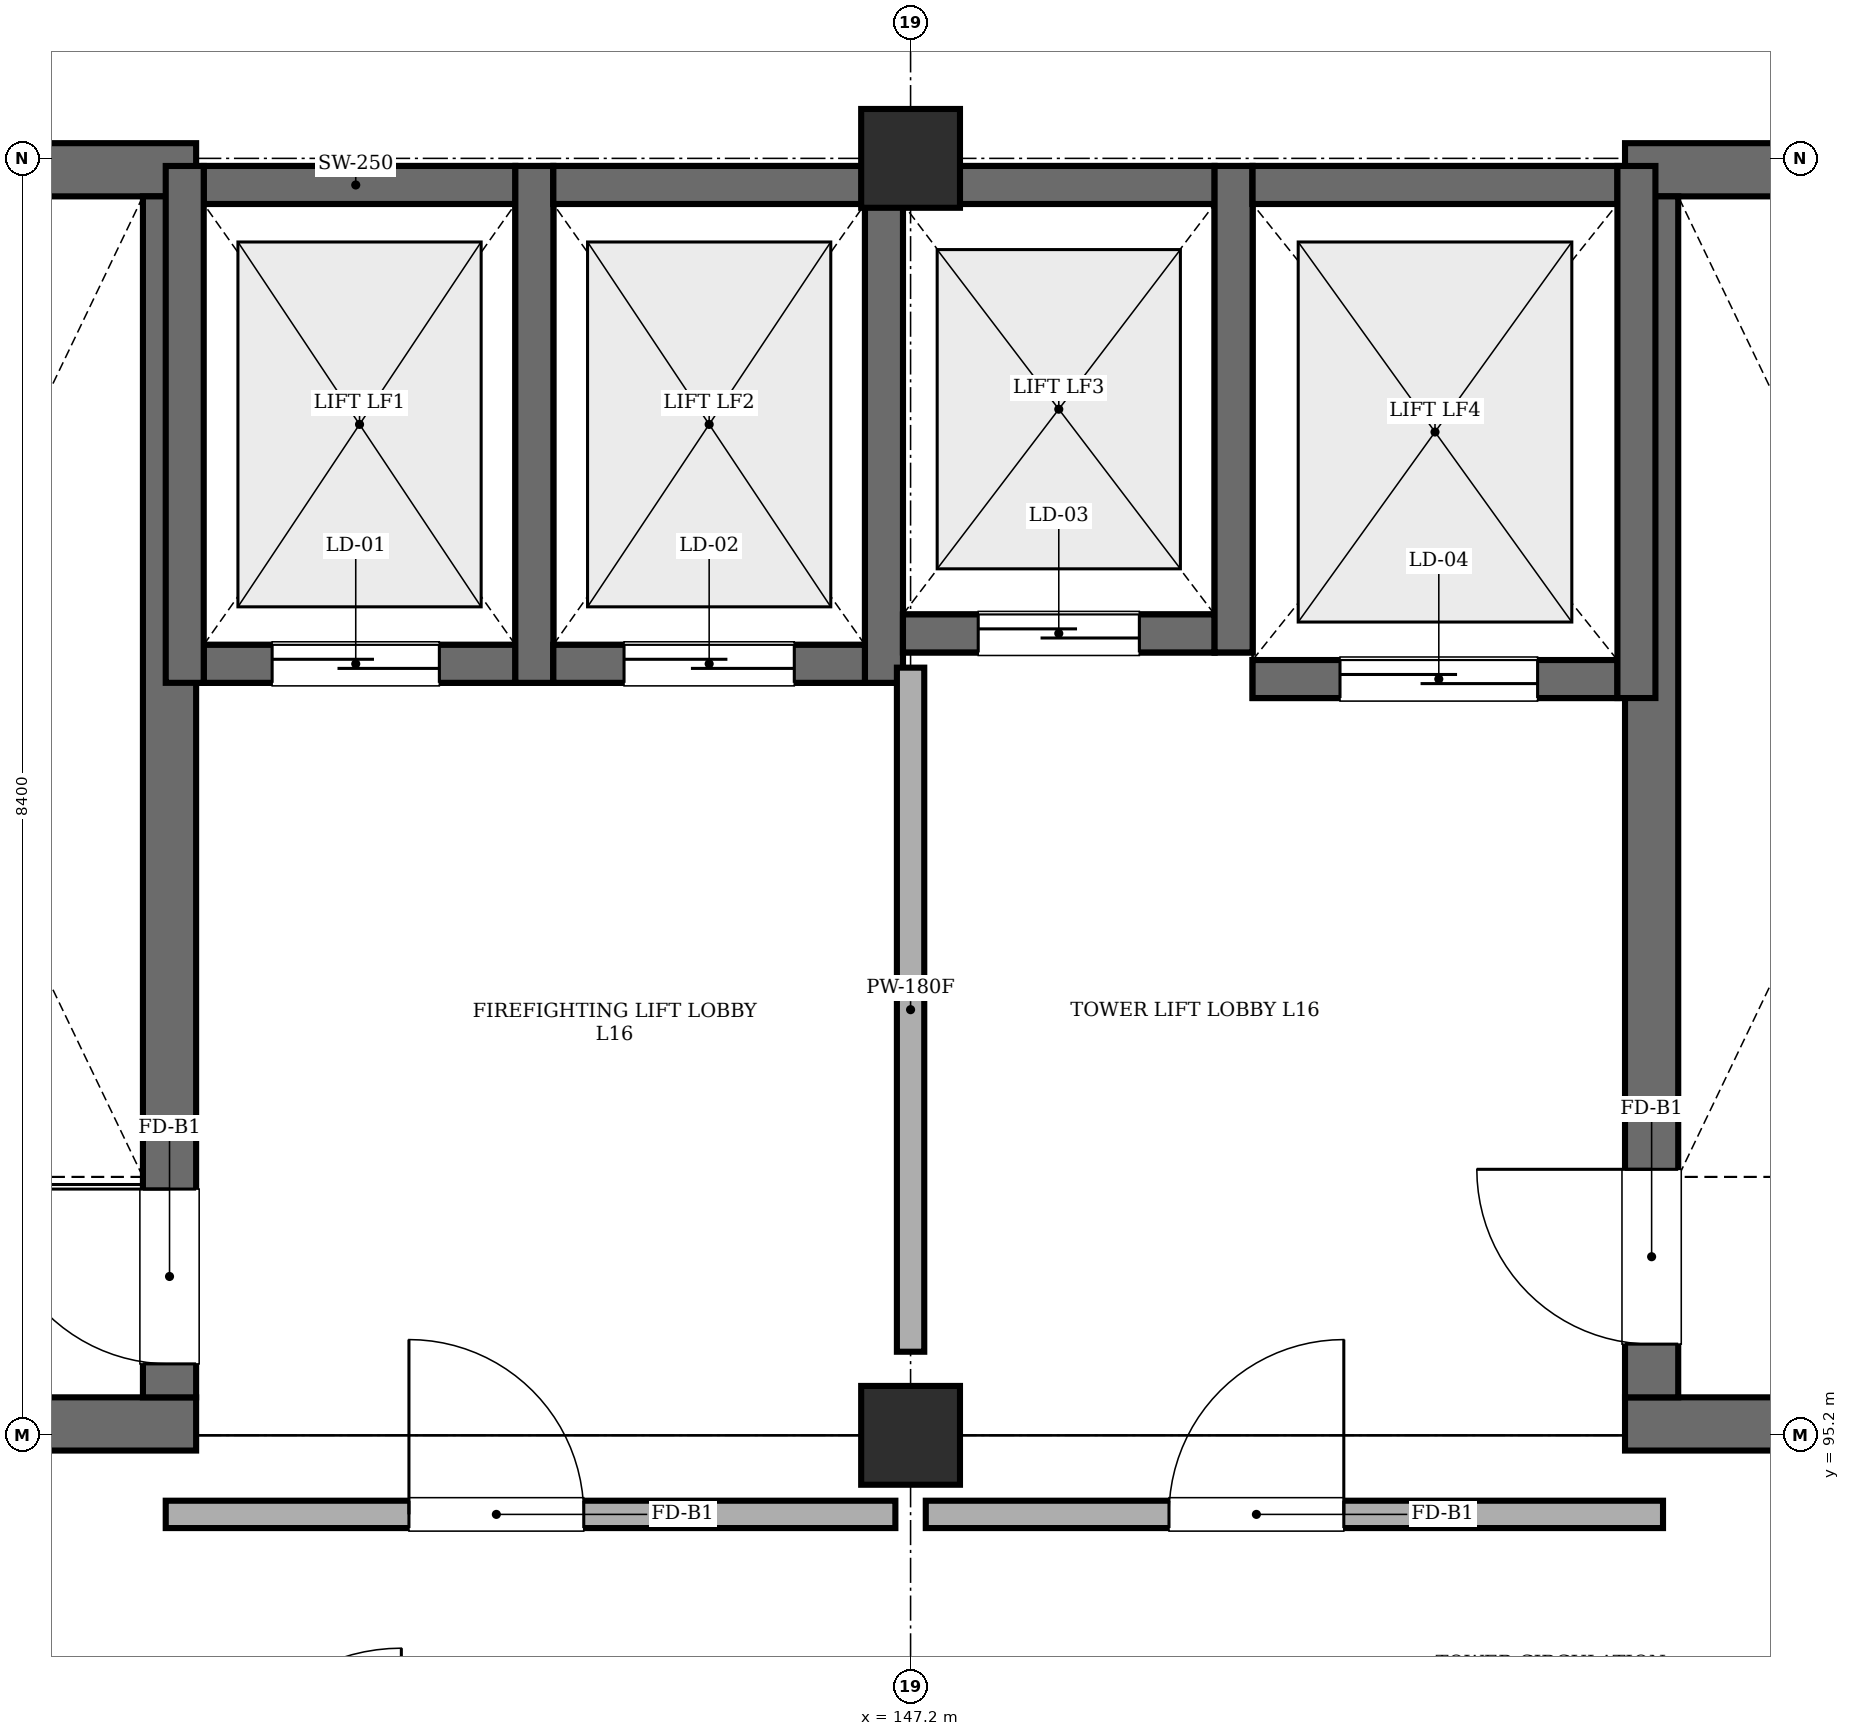
"""IFC4 building model, lengths in metres.
Left out: names, types, materials, properties, quantities, classifications, styles, units other than length and angle.
Written with IfcOpenShell. Run it as: python <this file> out.ifc"""

import sys

from ifc_helpers import new_model, si_unit, direction, frame, frame_2d, origin, origin_2d, place, context, subcontext, project, spatial, rectangle, extrude, element, fill, save


model = new_model("IFC4")
c1 = context("Model", 3, precision=1e-05, world=origin(), true_north=direction((0.0, 1.0)))
c2 = subcontext(c1, "Body", "Model", "MODEL_VIEW")
j1 = project(units=[si_unit("LENGTHUNIT", "METRE"), si_unit("PLANEANGLEUNIT", "RADIAN")], contexts=[c1])
p1 = place(None, origin())
s1 = spatial("IfcSite", under=j1, at=p1, CompositionType="ELEMENT")
p2 = place(p1, origin())
s2 = spatial("IfcBuilding", under=s1, at=p2, CompositionType="ELEMENT")
p3 = place(p2, frame((0.0, 0.0, 65.7)))
s3 = spatial("IfcBuildingStorey", under=s2, at=p3, CompositionType="ELEMENT", Elevation=65.7)
for number, where, z_axis, x_axis in (
    (1, (147.2, 95.2, 0.0), (0.0, 0.0, 1.0), (1.0, 0.0, 0.0)),
    (2, (147.2, 103.6, 0.0), (0.0, 0.0, 1.0), (1.0, 0.0, 0.0)),
):
    element("IfcColumn", number, at=place(p3, frame(where, z_axis=z_axis, x_axis=x_axis)), inside=s3, PredefinedType="COLUMN", context=c2, shape_type="SweptSolid", body=[
        extrude(rectangle(XDim=0.65, YDim=0.65, at=origin_2d()), origin(), (0.0, 0.0, 1.0), 4.3),
    ])
for number, where, z_axis, x_axis in (
    (3, (138.7, 95.275, 0.0), (0.0, 0.0, 1.0), (1.0, 0.0, 0.0)),
    (4, (138.7, 103.525, 0.0), (0.0, 0.0, 1.0), (1.0, 0.0, 0.0)),
):
    element("IfcWall", number, at=place(p3, frame(where, z_axis=z_axis, x_axis=x_axis)), inside=s3, PredefinedType="SHEAR", context=c2, shape_type="SweptSolid", body=[
        extrude(rectangle(XDim=3.8, YDim=0.35, at=frame_2d((1.9, 0.0))), origin(), (0.0, 0.0, 1.0), 4.3),
    ])
p4 = place(p3, frame((142.325, 95.45, 0.0), z_axis=(0.0, 0.0, 1.0), x_axis=(0.0, 1.0, 0.0)))
e5 = element("IfcWall", 5, at=p4, inside=s3, PredefinedType="SHEAR", context=c2, shape_type="SweptSolid", body=[
    extrude(rectangle(XDim=7.9, YDim=0.35, at=frame_2d((3.95, 0.0))), origin(), (0.0, 0.0, 1.0), 4.3),
])
p5 = place(p4, frame((0.22, 0.0, 0.0)))
e6 = element("IfcOpeningElement", 6, at=p5, cuts=e5, PredefinedType="OPENING", context=c2, shape_type="SweptSolid", body=[
    extrude(rectangle(XDim=1.15, YDim=2.15, at=frame_2d((0.575, 1.075))), frame((0.0, 0.185, 0.0), z_axis=(0.0, -1.0, 0.0), x_axis=(1.0, 0.0, 0.0)), (0.0, 0.0, 1.0), 0.37),
])
for number, where, z_axis, x_axis in (
    (7, (151.9, 95.275, 0.0), (0.0, 0.0, 1.0), (1.0, 0.0, 0.0)),
    (8, (151.9, 103.525, 0.0), (0.0, 0.0, 1.0), (1.0, 0.0, 0.0)),
):
    element("IfcWall", number, at=place(p3, frame(where, z_axis=z_axis, x_axis=x_axis)), inside=s3, PredefinedType="SHEAR", context=c2, shape_type="SweptSolid", body=[
        extrude(rectangle(XDim=3.8, YDim=0.35, at=frame_2d((1.9, 0.0))), origin(), (0.0, 0.0, 1.0), 4.3),
    ])
p6 = place(p3, frame((152.075, 95.45, 0.0), z_axis=(0.0, 0.0, 1.0), x_axis=(0.0, 1.0, 0.0)))
e9 = element("IfcWall", 9, at=p6, inside=s3, PredefinedType="SHEAR", context=c2, shape_type="SweptSolid", body=[
    extrude(rectangle(XDim=7.9, YDim=0.35, at=frame_2d((3.95, 0.0))), origin(), (0.0, 0.0, 1.0), 4.3),
])
p7 = place(p6, frame((0.35, 0.0, 0.0)))
e10 = element("IfcOpeningElement", 10, at=p7, cuts=e9, PredefinedType="OPENING", context=c2, shape_type="SweptSolid", body=[
    extrude(rectangle(XDim=1.15, YDim=2.15, at=frame_2d((0.575, 1.075))), frame((0.0, 0.185, 0.0), z_axis=(0.0, -1.0, 0.0), x_axis=(1.0, 0.0, 0.0)), (0.0, 0.0, 1.0), 0.37),
])
p8 = place(p3, frame((142.5, 100.275, 0.0), z_axis=(0.0, 0.0, 1.0), x_axis=(1.0, 0.0, 0.0)))
e11 = element("IfcWall", 11, at=p8, inside=s3, PredefinedType="SHEAR", context=c2, shape_type="SweptSolid", body=[
    extrude(rectangle(XDim=2.1, YDim=0.25, at=frame_2d((1.05, 0.0))), origin(), (0.0, 0.0, 1.0), 4.3),
])
p9 = place(p8, frame((0.5, 0.0, 0.0)))
e12 = element("IfcOpeningElement", 12, at=p9, cuts=e11, PredefinedType="OPENING", context=c2, shape_type="SweptSolid", body=[
    extrude(rectangle(XDim=1.1, YDim=2.15, at=frame_2d((0.55, 1.075))), frame((0.0, 0.135, 0.0), z_axis=(0.0, -1.0, 0.0), x_axis=(1.0, 0.0, 0.0)), (0.0, 0.0, 1.0), 0.27),
])
p10 = place(p3, frame((142.5, 103.425, 0.0), z_axis=(0.0, 0.0, 1.0), x_axis=(1.0, 0.0, 0.0)))
e13 = element("IfcWall", 13, at=p10, inside=s3, PredefinedType="SHEAR", context=c2, shape_type="SweptSolid", body=[
    extrude(rectangle(XDim=2.1, YDim=0.25, at=frame_2d((1.05, 0.0))), origin(), (0.0, 0.0, 1.0), 4.3),
])
p11 = place(p3, frame((144.725, 100.15, 0.0), z_axis=(0.0, 0.0, 1.0), x_axis=(0.0, 1.0, 0.0)))
e14 = element("IfcWall", 14, at=p11, inside=s3, PredefinedType="SHEAR", context=c2, shape_type="SweptSolid", body=[
    extrude(rectangle(XDim=3.4, YDim=0.25, at=frame_2d((1.7, 0.0))), origin(), (0.0, 0.0, 1.0), 4.3),
])
for number, where, z_axis, x_axis in (
    (15, (142.55, 100.275, 4.5), (0.0, 0.0, 1.0), (1.0, 0.0, 0.0)),
    (16, (142.55, 103.425, 4.5), (0.0, 0.0, 1.0), (1.0, 0.0, 0.0)),
):
    element("IfcWall", number, at=place(p3, frame(where, z_axis=z_axis, x_axis=x_axis)), inside=s3, PredefinedType="SHEAR", context=c2, shape_type="SweptSolid", body=[
        extrude(rectangle(XDim=2.05, YDim=0.25, at=frame_2d((1.025, 0.0))), origin(), (0.0, 0.0, 1.0), 1.55),
    ])
for number, where, z_axis, x_axis in (
    (17, (144.725, 100.15, 4.5), (0.0, 0.0, 1.0), (0.0, 1.0, 0.0)),
    (18, (142.425, 100.15, 4.5), (0.0, 0.0, 1.0), (0.0, 1.0, 0.0)),
):
    element("IfcWall", number, at=place(p3, frame(where, z_axis=z_axis, x_axis=x_axis)), inside=s3, PredefinedType="SHEAR", context=c2, shape_type="SweptSolid", body=[
        extrude(rectangle(XDim=3.4, YDim=0.25, at=frame_2d((1.7, 0.0))), origin(), (0.0, 0.0, 1.0), 1.55),
    ])
p12 = place(p3, frame((144.85, 100.275, 0.0), z_axis=(0.0, 0.0, 1.0), x_axis=(1.0, 0.0, 0.0)))
e19 = element("IfcWall", 19, at=p12, inside=s3, PredefinedType="SHEAR", context=c2, shape_type="SweptSolid", body=[
    extrude(rectangle(XDim=2.05, YDim=0.25, at=frame_2d((1.025, 0.0))), origin(), (0.0, 0.0, 1.0), 4.3),
])
p13 = place(p12, frame((0.465, 0.0, 0.0)))
e20 = element("IfcOpeningElement", 20, at=p13, cuts=e19, PredefinedType="OPENING", context=c2, shape_type="SweptSolid", body=[
    extrude(rectangle(XDim=1.12, YDim=2.15, at=frame_2d((0.56, 1.075))), frame((0.0, 0.135, 0.0), z_axis=(0.0, -1.0, 0.0), x_axis=(1.0, 0.0, 0.0)), (0.0, 0.0, 1.0), 0.27),
])
p14 = place(p3, frame((144.85, 103.425, 0.0), z_axis=(0.0, 0.0, 1.0), x_axis=(1.0, 0.0, 0.0)))
e21 = element("IfcWall", 21, at=p14, inside=s3, PredefinedType="SHEAR", context=c2, shape_type="SweptSolid", body=[
    extrude(rectangle(XDim=2.05, YDim=0.25, at=frame_2d((1.025, 0.0))), origin(), (0.0, 0.0, 1.0), 4.3),
])
p15 = place(p3, frame((147.025, 100.15, 0.0), z_axis=(0.0, 0.0, 1.0), x_axis=(0.0, 1.0, 0.0)))
e22 = element("IfcWall", 22, at=p15, inside=s3, PredefinedType="SHEAR", context=c2, shape_type="SweptSolid", body=[
    extrude(rectangle(XDim=3.4, YDim=0.25, at=frame_2d((1.7, 0.0))), origin(), (0.0, 0.0, 1.0), 4.3),
])
for number, where, z_axis, x_axis in (
    (23, (144.85, 100.275, 4.5), (0.0, 0.0, 1.0), (1.0, 0.0, 0.0)),
    (24, (144.85, 103.425, 4.5), (0.0, 0.0, 1.0), (1.0, 0.0, 0.0)),
):
    element("IfcWall", number, at=place(p3, frame(where, z_axis=z_axis, x_axis=x_axis)), inside=s3, PredefinedType="SHEAR", context=c2, shape_type="SweptSolid", body=[
        extrude(rectangle(XDim=2.05, YDim=0.25, at=frame_2d((1.025, 0.0))), origin(), (0.0, 0.0, 1.0), 1.55),
    ])
p16 = place(p3, frame((147.025, 100.15, 4.5), z_axis=(0.0, 0.0, 1.0), x_axis=(0.0, 1.0, 0.0)))
e25 = element("IfcWall", 25, at=p16, inside=s3, PredefinedType="SHEAR", context=c2, shape_type="SweptSolid", body=[
    extrude(rectangle(XDim=3.4, YDim=0.25, at=frame_2d((1.7, 0.0))), origin(), (0.0, 0.0, 1.0), 1.55),
])
p17 = place(p3, frame((147.15, 100.475, 0.0), z_axis=(0.0, 0.0, 1.0), x_axis=(1.0, 0.0, 0.0)))
e26 = element("IfcWall", 26, at=p17, inside=s3, PredefinedType="SHEAR", context=c2, shape_type="SweptSolid", body=[
    extrude(rectangle(XDim=2.05, YDim=0.25, at=frame_2d((1.025, 0.0))), origin(), (0.0, 0.0, 1.0), 4.3),
])
p18 = place(p17, frame((0.495, 0.0, 0.0)))
e27 = element("IfcOpeningElement", 27, at=p18, cuts=e26, PredefinedType="OPENING", context=c2, shape_type="SweptSolid", body=[
    extrude(rectangle(XDim=1.06, YDim=2.15, at=frame_2d((0.53, 1.075))), frame((0.0, 0.135, 0.0), z_axis=(0.0, -1.0, 0.0), x_axis=(1.0, 0.0, 0.0)), (0.0, 0.0, 1.0), 0.27),
])
p19 = place(p3, frame((147.15, 103.425, 0.0), z_axis=(0.0, 0.0, 1.0), x_axis=(1.0, 0.0, 0.0)))
e28 = element("IfcWall", 28, at=p19, inside=s3, PredefinedType="SHEAR", context=c2, shape_type="SweptSolid", body=[
    extrude(rectangle(XDim=2.05, YDim=0.25, at=frame_2d((1.025, 0.0))), origin(), (0.0, 0.0, 1.0), 4.3),
])
p20 = place(p3, frame((149.325, 100.35, 0.0), z_axis=(0.0, 0.0, 1.0), x_axis=(0.0, 1.0, 0.0)))
e29 = element("IfcWall", 29, at=p20, inside=s3, PredefinedType="SHEAR", context=c2, shape_type="SweptSolid", body=[
    extrude(rectangle(XDim=3.2, YDim=0.25, at=frame_2d((1.6, 0.0))), origin(), (0.0, 0.0, 1.0), 4.3),
])
for number, where, z_axis, x_axis in (
    (30, (147.15, 100.475, 4.5), (0.0, 0.0, 1.0), (1.0, 0.0, 0.0)),
    (31, (147.15, 103.425, 4.5), (0.0, 0.0, 1.0), (1.0, 0.0, 0.0)),
):
    element("IfcWall", number, at=place(p3, frame(where, z_axis=z_axis, x_axis=x_axis)), inside=s3, PredefinedType="SHEAR", context=c2, shape_type="SweptSolid", body=[
        extrude(rectangle(XDim=2.05, YDim=0.25, at=frame_2d((1.025, 0.0))), origin(), (0.0, 0.0, 1.0), 1.55),
    ])
p21 = place(p3, frame((149.325, 100.35, 4.5), z_axis=(0.0, 0.0, 1.0), x_axis=(0.0, 1.0, 0.0)))
e32 = element("IfcWall", 32, at=p21, inside=s3, PredefinedType="SHEAR", context=c2, shape_type="SweptSolid", body=[
    extrude(rectangle(XDim=3.2, YDim=0.25, at=frame_2d((1.6, 0.0))), origin(), (0.0, 0.0, 1.0), 1.55),
])
p22 = place(p3, frame((149.45, 100.175, 0.0), z_axis=(0.0, 0.0, 1.0), x_axis=(1.0, 0.0, 0.0)))
e33 = element("IfcWall", 33, at=p22, inside=s3, PredefinedType="SHEAR", context=c2, shape_type="SweptSolid", body=[
    extrude(rectangle(XDim=2.45, YDim=0.25, at=frame_2d((1.225, 0.0))), origin(), (0.0, 0.0, 1.0), 4.3),
])
p23 = place(p22, frame((0.575, 0.0, 0.0)))
e34 = element("IfcOpeningElement", 34, at=p23, cuts=e33, PredefinedType="OPENING", context=c2, shape_type="SweptSolid", body=[
    extrude(rectangle(XDim=1.3, YDim=2.25, at=frame_2d((0.65, 1.125))), frame((0.0, 0.135, 0.0), z_axis=(0.0, -1.0, 0.0), x_axis=(1.0, 0.0, 0.0)), (0.0, 0.0, 1.0), 0.27),
])
p24 = place(p3, frame((149.45, 103.425, 0.0), z_axis=(0.0, 0.0, 1.0), x_axis=(1.0, 0.0, 0.0)))
e35 = element("IfcWall", 35, at=p24, inside=s3, PredefinedType="SHEAR", context=c2, shape_type="SweptSolid", body=[
    extrude(rectangle(XDim=2.45, YDim=0.25, at=frame_2d((1.225, 0.0))), origin(), (0.0, 0.0, 1.0), 4.3),
])
for number, where, z_axis, x_axis in (
    (36, (149.45, 100.175, 4.5), (0.0, 0.0, 1.0), (1.0, 0.0, 0.0)),
    (37, (149.45, 103.425, 4.5), (0.0, 0.0, 1.0), (1.0, 0.0, 0.0)),
):
    element("IfcWall", number, at=place(p3, frame(where, z_axis=z_axis, x_axis=x_axis)), inside=s3, PredefinedType="SHEAR", context=c2, shape_type="SweptSolid", body=[
        extrude(rectangle(XDim=2.4, YDim=0.25, at=frame_2d((1.2, 0.0))), origin(), (0.0, 0.0, 1.0), 1.55),
    ])
p25 = place(p3, frame((151.975, 100.05, 4.5), z_axis=(0.0, 0.0, 1.0), x_axis=(0.0, 1.0, 0.0)))
e38 = element("IfcWall", 38, at=p25, inside=s3, PredefinedType="SHEAR", context=c2, shape_type="SweptSolid", body=[
    extrude(rectangle(XDim=3.5, YDim=0.25, at=frame_2d((1.75, 0.0))), origin(), (0.0, 0.0, 1.0), 1.55),
])
p26 = place(p3, frame((142.3, 94.68, 0.0), z_axis=(0.0, 0.0, 1.0), x_axis=(1.0, 0.0, 0.0)))
e39 = element("IfcWall", 39, at=p26, inside=s3, PredefinedType="STANDARD", context=c2, shape_type="SweptSolid", body=[
    extrude(rectangle(XDim=4.8, YDim=0.18, at=frame_2d((2.4, 0.0))), origin(), (0.0, 0.0, 1.0), 4.3),
])
p27 = place(p26, frame((1.6, 0.0, 0.0)))
e40 = element("IfcOpeningElement", 40, at=p27, cuts=e39, PredefinedType="OPENING", context=c2, shape_type="SweptSolid", body=[
    extrude(rectangle(XDim=1.15, YDim=2.15, at=frame_2d((0.575, 1.075))), frame((0.0, 0.1, 0.0), z_axis=(0.0, -1.0, 0.0), x_axis=(1.0, 0.0, 0.0)), (0.0, 0.0, 1.0), 0.2),
])
p28 = place(p3, frame((147.3, 94.68, 0.0), z_axis=(0.0, 0.0, 1.0), x_axis=(1.0, 0.0, 0.0)))
e41 = element("IfcWall", 41, at=p28, inside=s3, PredefinedType="STANDARD", context=c2, shape_type="SweptSolid", body=[
    extrude(rectangle(XDim=4.85, YDim=0.18, at=frame_2d((2.425, 0.0))), origin(), (0.0, 0.0, 1.0), 4.3),
])
p29 = place(p28, frame((1.6, 0.0, 0.0)))
e42 = element("IfcOpeningElement", 42, at=p29, cuts=e41, PredefinedType="OPENING", context=c2, shape_type="SweptSolid", body=[
    extrude(rectangle(XDim=1.15, YDim=2.15, at=frame_2d((0.575, 1.075))), frame((0.0, 0.1, 0.0), z_axis=(0.0, -1.0, 0.0), x_axis=(1.0, 0.0, 0.0)), (0.0, 0.0, 1.0), 0.2),
])
p30 = place(p3, frame((147.2, 95.75, 0.0), z_axis=(0.0, 0.0, 1.0), x_axis=(0.0, 1.0, 0.0)))
e43 = element("IfcWall", 43, at=p30, inside=s3, PredefinedType="STANDARD", context=c2, shape_type="SweptSolid", body=[
    extrude(rectangle(XDim=4.5, YDim=0.18, at=frame_2d((2.25, 0.0))), origin(), (0.0, 0.0, 1.0), 3.7),
])
p31 = place(p27, origin())
e44 = element("IfcDoor", 44, at=p31, inside=s3, OperationType="SINGLE_SWING_LEFT", PredefinedType="DOOR", context=c2, shape_type="SweptSolid", body=[
    extrude(rectangle(XDim=1.15, YDim=2.15, at=frame_2d((0.575, 1.075))), frame((0.0, 0.025, 0.0), z_axis=(0.0, -1.0, 0.0), x_axis=(1.0, 0.0, 0.0)), (0.0, 0.0, 1.0), 0.05),
])
fill(e40, e44)
p32 = place(p29, origin())
e45 = element("IfcDoor", 45, at=p32, inside=s3, OperationType="SINGLE_SWING_RIGHT", PredefinedType="DOOR", context=c2, shape_type="SweptSolid", body=[
    extrude(rectangle(XDim=1.15, YDim=2.15, at=frame_2d((0.575, 1.075))), frame((0.0, 0.025, 0.0), z_axis=(0.0, -1.0, 0.0), x_axis=(1.0, 0.0, 0.0)), (0.0, 0.0, 1.0), 0.05),
])
fill(e42, e45)
p33 = place(p5, origin())
e46 = element("IfcDoor", 46, at=p33, inside=s3, OperationType="SINGLE_SWING_RIGHT", PredefinedType="DOOR", context=c2, shape_type="SweptSolid", body=[
    extrude(rectangle(XDim=1.15, YDim=2.15, at=frame_2d((0.575, 1.075))), frame((0.0, 0.025, 0.0), z_axis=(0.0, -1.0, 0.0), x_axis=(1.0, 0.0, 0.0)), (0.0, 0.0, 1.0), 0.05),
])
fill(e6, e46)
p34 = place(p7, origin())
e47 = element("IfcDoor", 47, at=p34, inside=s3, OperationType="SINGLE_SWING_RIGHT", PredefinedType="DOOR", context=c2, shape_type="SweptSolid", body=[
    extrude(rectangle(XDim=1.15, YDim=2.15, at=frame_2d((0.575, 1.075))), frame((0.0, 0.025, 0.0), z_axis=(0.0, -1.0, 0.0), x_axis=(1.0, 0.0, 0.0)), (0.0, 0.0, 1.0), 0.05),
])
fill(e10, e47)
p35 = place(p9, origin())
e48 = element("IfcDoor", 48, at=p35, inside=s3, OperationType="SLIDING_TO_LEFT", PredefinedType="DOOR", context=c2, shape_type="SweptSolid", body=[
    extrude(rectangle(XDim=1.1, YDim=2.15, at=frame_2d((0.55, 1.075))), frame((0.0, 0.025, 0.0), z_axis=(0.0, -1.0, 0.0), x_axis=(1.0, 0.0, 0.0)), (0.0, 0.0, 1.0), 0.05),
])
fill(e12, e48)
p36 = place(p13, origin())
e49 = element("IfcDoor", 49, at=p36, inside=s3, OperationType="SLIDING_TO_LEFT", PredefinedType="DOOR", context=c2, shape_type="SweptSolid", body=[
    extrude(rectangle(XDim=1.12, YDim=2.15, at=frame_2d((0.56, 1.075))), frame((0.0, 0.025, 0.0), z_axis=(0.0, -1.0, 0.0), x_axis=(1.0, 0.0, 0.0)), (0.0, 0.0, 1.0), 0.05),
])
fill(e20, e49)
p37 = place(p18, origin())
e50 = element("IfcDoor", 50, at=p37, inside=s3, OperationType="SLIDING_TO_LEFT", PredefinedType="DOOR", context=c2, shape_type="SweptSolid", body=[
    extrude(rectangle(XDim=1.06, YDim=2.15, at=frame_2d((0.53, 1.075))), frame((0.0, 0.025, 0.0), z_axis=(0.0, -1.0, 0.0), x_axis=(1.0, 0.0, 0.0)), (0.0, 0.0, 1.0), 0.05),
])
fill(e27, e50)
p38 = place(p23, origin())
e51 = element("IfcDoor", 51, at=p38, inside=s3, OperationType="SLIDING_TO_LEFT", PredefinedType="DOOR", context=c2, shape_type="SweptSolid", body=[
    extrude(rectangle(XDim=1.3, YDim=2.25, at=frame_2d((0.65, 1.125))), frame((0.0, 0.025, 0.0), z_axis=(0.0, -1.0, 0.0), x_axis=(1.0, 0.0, 0.0)), (0.0, 0.0, 1.0), 0.05),
])
fill(e34, e51)
save(model, sys.argv[1])
